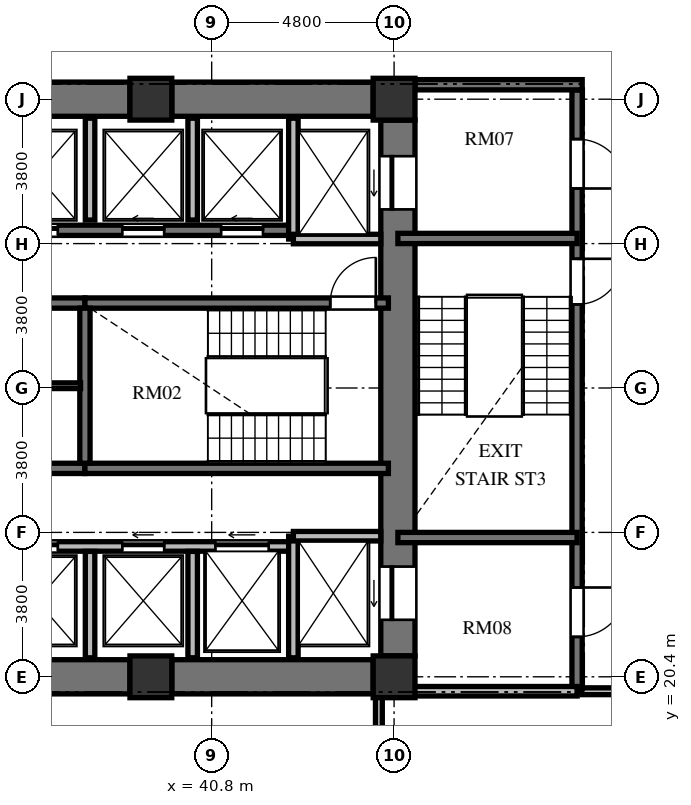
"""IFC4 building model, lengths in metres.
Left out: names, types, materials, properties, quantities, classifications, styles, units other than length and angle.
Written with IfcOpenShell. Run it as: python <this file> out.ifc"""

import sys

from ifc_helpers import new_model, si_unit, direction, frame, frame_2d, origin, origin_2d, place, context, subcontext, project, spatial, rectangle, extrude, element, fill, save


model = new_model("IFC4")
c1 = context("Model", 3, precision=1e-05, world=origin(), true_north=direction((0.0, 1.0)))
c2 = subcontext(c1, "Body", "Model", "MODEL_VIEW")
j1 = project(units=[si_unit("LENGTHUNIT", "METRE"), si_unit("PLANEANGLEUNIT", "RADIAN")], contexts=[c1])
p1 = place(None, origin())
s1 = spatial("IfcSite", under=j1, at=p1, CompositionType="ELEMENT")
p2 = place(p1, origin())
s2 = spatial("IfcBuilding", under=s1, at=p2, CompositionType="ELEMENT")
p3 = place(p2, frame((0.0, 0.0, 32.496)))
s3 = spatial("IfcBuildingStorey", under=s2, at=p3, CompositionType="ELEMENT", Elevation=32.496)
for number, where, z_axis, x_axis in (
    (1, (39.2, 20.4, 0.0), (0.0, 0.0, 1.0), (1.0, 0.0, 0.0)),
    (2, (45.6, 20.4, 0.0), (0.0, 0.0, 1.0), (1.0, 0.0, 0.0)),
    (3, (45.6, 35.6, 0.0), (0.0, 0.0, 1.0), (1.0, 0.0, 0.0)),
    (4, (39.2, 35.6, 0.0), (0.0, 0.0, 1.0), (1.0, 0.0, 0.0)),
):
    element("IfcColumn", number, at=place(p3, frame(where, z_axis=z_axis, x_axis=x_axis)), inside=s3, PredefinedType="COLUMN", context=c2, shape_type="SweptSolid", body=[
        extrude(rectangle(XDim=1.1, YDim=1.1, at=origin_2d()), origin(), (0.0, 0.0, 1.0), 3.648),
    ])
p4 = place(p3, frame((45.7, 20.95, 0.0), z_axis=(0.0, 0.0, 1.0), x_axis=(0.0, 1.0, 0.0)))
e5 = element("IfcWall", 5, at=p4, inside=s3, PredefinedType="SHEAR", context=c2, shape_type="SweptSolid", body=[
    extrude(rectangle(XDim=14.1, YDim=0.9, at=frame_2d((7.05, 0.0))), origin(), (0.0, 0.0, 1.0), 3.648),
])
p5 = place(p4, frame((11.75, 0.0, 0.0)))
e6 = element("IfcOpeningElement", 6, at=p5, cuts=e5, PredefinedType="OPENING", context=c2, shape_type="SweptSolid", body=[
    extrude(rectangle(XDim=1.4, YDim=2.3, at=frame_2d((0.7, 1.15))), frame((0.0, 0.46, 0.0), z_axis=(0.0, -1.0, 0.0), x_axis=(1.0, 0.0, 0.0)), (0.0, 0.0, 1.0), 0.92),
])
p6 = place(p4, frame((0.95, 0.0, 0.0)))
e7 = element("IfcOpeningElement", 7, at=p6, cuts=e5, PredefinedType="OPENING", context=c2, shape_type="SweptSolid", body=[
    extrude(rectangle(XDim=1.4, YDim=2.3, at=frame_2d((0.7, 1.15))), frame((0.0, 0.46, 0.0), z_axis=(0.0, -1.0, 0.0), x_axis=(1.0, 0.0, 0.0)), (0.0, 0.0, 1.0), 0.92),
])
for number, where, z_axis, x_axis in (
    (8, (33.35, 20.4, 0.0), (0.0, 0.0, 1.0), (1.0, 0.0, 0.0)),
    (9, (33.35, 35.6, 0.0), (0.0, 0.0, 1.0), (1.0, 0.0, 0.0)),
):
    element("IfcWall", number, at=place(p3, frame(where, z_axis=z_axis, x_axis=x_axis)), inside=s3, PredefinedType="SHEAR", context=c2, shape_type="SweptSolid", body=[
        extrude(rectangle(XDim=5.3, YDim=0.9, at=frame_2d((2.65, 0.0))), origin(), (0.0, 0.0, 1.0), 3.648),
    ])
for number, where, z_axis, x_axis in (
    (10, (39.75, 20.4, 0.0), (0.0, 0.0, 1.0), (1.0, 0.0, 0.0)),
    (11, (39.75, 35.6, 0.0), (0.0, 0.0, 1.0), (1.0, 0.0, 0.0)),
):
    element("IfcWall", number, at=place(p3, frame(where, z_axis=z_axis, x_axis=x_axis)), inside=s3, PredefinedType="SHEAR", context=c2, shape_type="SweptSolid", body=[
        extrude(rectangle(XDim=5.3, YDim=0.9, at=frame_2d((2.65, 0.0))), origin(), (0.0, 0.0, 1.0), 3.648),
    ])
p7 = place(p3, frame((34.535, 30.235, 0.0), z_axis=(0.0, 0.0, 1.0), x_axis=(1.0, 0.0, 0.0)))
e12 = element("IfcWall", 12, at=p7, inside=s3, PredefinedType="SHEAR", context=c2, shape_type="SweptSolid", body=[
    extrude(rectangle(XDim=2.93, YDim=0.27, at=frame_2d((1.465, 0.0))), origin(), (0.0, 0.0, 1.0), 3.648),
])
p8 = place(p7, frame((0.915, 0.0, 0.0)))
e13 = element("IfcOpeningElement", 13, at=p8, cuts=e12, PredefinedType="OPENING", context=c2, shape_type="SweptSolid", body=[
    extrude(rectangle(XDim=1.1, YDim=2.15, at=frame_2d((0.55, 1.075))), frame((0.0, 0.145, 0.0), z_axis=(0.0, -1.0, 0.0), x_axis=(1.0, 0.0, 0.0)), (0.0, 0.0, 1.0), 0.29),
])
p9 = place(p3, frame((37.465, 30.235, 0.0), z_axis=(0.0, 0.0, 1.0), x_axis=(1.0, 0.0, 0.0)))
e14 = element("IfcWall", 14, at=p9, inside=s3, PredefinedType="SHEAR", context=c2, shape_type="SweptSolid", body=[
    extrude(rectangle(XDim=7.985, YDim=0.27, at=frame_2d((3.992, 0.0))), origin(), (0.0, 0.0, 1.0), 3.648),
])
p10 = place(p9, frame((6.455, 0.0, 0.0)))
e15 = element("IfcOpeningElement", 15, at=p10, cuts=e14, PredefinedType="OPENING", context=c2, shape_type="SweptSolid", body=[
    extrude(rectangle(XDim=1.2, YDim=2.15, at=frame_2d((0.6, 1.075))), frame((0.0, 0.145, 0.0), z_axis=(0.0, -1.0, 0.0), x_axis=(1.0, 0.0, 0.0)), (0.0, 0.0, 1.0), 0.29),
])
p11 = place(p3, frame((34.535, 25.885, 0.0), z_axis=(0.0, 0.0, 1.0), x_axis=(1.0, 0.0, 0.0)))
e16 = element("IfcWall", 16, at=p11, inside=s3, PredefinedType="SHEAR", context=c2, shape_type="SweptSolid", body=[
    extrude(rectangle(XDim=2.93, YDim=0.27, at=frame_2d((1.465, 0.0))), origin(), (0.0, 0.0, 1.0), 3.648),
])
p12 = place(p11, frame((0.94, 0.0, 0.0)))
e17 = element("IfcOpeningElement", 17, at=p12, cuts=e16, PredefinedType="OPENING", context=c2, shape_type="SweptSolid", body=[
    extrude(rectangle(XDim=1.05, YDim=2.15, at=frame_2d((0.525, 1.075))), frame((0.0, 0.145, 0.0), z_axis=(0.0, -1.0, 0.0), x_axis=(1.0, 0.0, 0.0)), (0.0, 0.0, 1.0), 0.29),
])
p13 = place(p3, frame((37.465, 25.885, 0.0), z_axis=(0.0, 0.0, 1.0), x_axis=(1.0, 0.0, 0.0)))
e18 = element("IfcWall", 18, at=p13, inside=s3, PredefinedType="SHEAR", context=c2, shape_type="SweptSolid", body=[
    extrude(rectangle(XDim=7.985, YDim=0.27, at=frame_2d((3.992, 0.0))), origin(), (0.0, 0.0, 1.0), 3.648),
])
p14 = place(p3, frame((37.465, 26.02, 0.0), z_axis=(0.0, 0.0, 1.0), x_axis=(0.0, 1.0, 0.0)))
e19 = element("IfcWall", 19, at=p14, inside=s3, PredefinedType="SHEAR", context=c2, shape_type="SweptSolid", body=[
    extrude(rectangle(XDim=4.08, YDim=0.27, at=frame_2d((2.04, 0.0))), origin(), (0.0, 0.0, 1.0), 3.648),
])
p15 = place(p3, frame((34.65, 28.06, 0.0), z_axis=(0.0, 0.0, 1.0), x_axis=(1.0, 0.0, 0.0)))
e20 = element("IfcWall", 20, at=p15, inside=s3, PredefinedType="PARTITIONING", context=c2, shape_type="SweptSolid", body=[
    extrude(rectangle(XDim=2.7, YDim=0.15, at=frame_2d((1.35, 0.0))), origin(), (0.0, 0.0, 1.0), 3.428),
])
p16 = place(p3, frame((26.55, 32.15, 0.0), z_axis=(0.0, 0.0, 1.0), x_axis=(1.0, 0.0, 0.0)))
e21 = element("IfcWall", 21, at=p16, inside=s3, PredefinedType="SHEAR", context=c2, shape_type="SweptSolid", body=[
    extrude(rectangle(XDim=16.4, YDim=0.27, at=frame_2d((8.2, 0.0))), origin(), (0.0, 0.0, 1.0), 3.648),
])
p17 = place(p16, frame((1.1, 0.0, 0.0)))
e22 = element("IfcOpeningElement", 22, at=p17, cuts=e21, PredefinedType="OPENING", context=c2, shape_type="SweptSolid", body=[
    extrude(rectangle(XDim=1.1, YDim=2.2, at=frame_2d((0.55, 1.1))), frame((0.0, 0.145, 0.0), z_axis=(0.0, -1.0, 0.0), x_axis=(1.0, 0.0, 0.0)), (0.0, 0.0, 1.0), 0.29),
])
p18 = place(p16, frame((3.7, 0.0, 0.0)))
e23 = element("IfcOpeningElement", 23, at=p18, cuts=e21, PredefinedType="OPENING", context=c2, shape_type="SweptSolid", body=[
    extrude(rectangle(XDim=1.1, YDim=2.2, at=frame_2d((0.55, 1.1))), frame((0.0, 0.145, 0.0), z_axis=(0.0, -1.0, 0.0), x_axis=(1.0, 0.0, 0.0)), (0.0, 0.0, 1.0), 0.29),
])
p19 = place(p16, frame((6.5, 0.0, 0.0)))
e24 = element("IfcOpeningElement", 24, at=p19, cuts=e21, PredefinedType="OPENING", context=c2, shape_type="SweptSolid", body=[
    extrude(rectangle(XDim=1.1, YDim=2.2, at=frame_2d((0.55, 1.1))), frame((0.0, 0.145, 0.0), z_axis=(0.0, -1.0, 0.0), x_axis=(1.0, 0.0, 0.0)), (0.0, 0.0, 1.0), 0.29),
])
p20 = place(p16, frame((9.1, 0.0, 0.0)))
e25 = element("IfcOpeningElement", 25, at=p20, cuts=e21, PredefinedType="OPENING", context=c2, shape_type="SweptSolid", body=[
    extrude(rectangle(XDim=1.1, YDim=2.2, at=frame_2d((0.55, 1.1))), frame((0.0, 0.145, 0.0), z_axis=(0.0, -1.0, 0.0), x_axis=(1.0, 0.0, 0.0)), (0.0, 0.0, 1.0), 0.29),
])
p21 = place(p16, frame((11.9, 0.0, 0.0)))
e26 = element("IfcOpeningElement", 26, at=p21, cuts=e21, PredefinedType="OPENING", context=c2, shape_type="SweptSolid", body=[
    extrude(rectangle(XDim=1.1, YDim=2.2, at=frame_2d((0.55, 1.1))), frame((0.0, 0.145, 0.0), z_axis=(0.0, -1.0, 0.0), x_axis=(1.0, 0.0, 0.0)), (0.0, 0.0, 1.0), 0.29),
])
p22 = place(p16, frame((14.5, 0.0, 0.0)))
e27 = element("IfcOpeningElement", 27, at=p22, cuts=e21, PredefinedType="OPENING", context=c2, shape_type="SweptSolid", body=[
    extrude(rectangle(XDim=1.1, YDim=2.2, at=frame_2d((0.55, 1.1))), frame((0.0, 0.145, 0.0), z_axis=(0.0, -1.0, 0.0), x_axis=(1.0, 0.0, 0.0)), (0.0, 0.0, 1.0), 0.29),
])
p23 = place(p3, frame((26.75, 23.83, 0.0), z_axis=(0.0, 0.0, 1.0), x_axis=(1.0, 0.0, 0.0)))
e28 = element("IfcWall", 28, at=p23, inside=s3, PredefinedType="SOLIDWALL", context=c2, shape_type="SweptSolid", body=[
    extrude(rectangle(XDim=16.2, YDim=0.25, at=frame_2d((8.1, 0.0))), origin(), (0.0, 0.0, 1.0), 3.428),
])
p24 = place(p23, frame((0.9, 0.0, 0.0)))
e29 = element("IfcOpeningElement", 29, at=p24, cuts=e28, PredefinedType="OPENING", context=c2, shape_type="SweptSolid", body=[
    extrude(rectangle(XDim=1.1, YDim=2.2, at=frame_2d((0.55, 1.1))), frame((0.0, 0.135, 0.0), z_axis=(0.0, -1.0, 0.0), x_axis=(1.0, 0.0, 0.0)), (0.0, 0.0, 1.0), 0.27),
])
p25 = place(p23, frame((3.5, 0.0, 0.0)))
e30 = element("IfcOpeningElement", 30, at=p25, cuts=e28, PredefinedType="OPENING", context=c2, shape_type="SweptSolid", body=[
    extrude(rectangle(XDim=1.1, YDim=2.2, at=frame_2d((0.55, 1.1))), frame((0.0, 0.135, 0.0), z_axis=(0.0, -1.0, 0.0), x_axis=(1.0, 0.0, 0.0)), (0.0, 0.0, 1.0), 0.27),
])
p26 = place(p23, frame((6.3, 0.0, 0.0)))
e31 = element("IfcOpeningElement", 31, at=p26, cuts=e28, PredefinedType="OPENING", context=c2, shape_type="SweptSolid", body=[
    extrude(rectangle(XDim=1.1, YDim=2.2, at=frame_2d((0.55, 1.1))), frame((0.0, 0.135, 0.0), z_axis=(0.0, -1.0, 0.0), x_axis=(1.0, 0.0, 0.0)), (0.0, 0.0, 1.0), 0.27),
])
p27 = place(p23, frame((8.9, 0.0, 0.0)))
e32 = element("IfcOpeningElement", 32, at=p27, cuts=e28, PredefinedType="OPENING", context=c2, shape_type="SweptSolid", body=[
    extrude(rectangle(XDim=1.1, YDim=2.2, at=frame_2d((0.55, 1.1))), frame((0.0, 0.135, 0.0), z_axis=(0.0, -1.0, 0.0), x_axis=(1.0, 0.0, 0.0)), (0.0, 0.0, 1.0), 0.27),
])
p28 = place(p23, frame((11.7, 0.0, 0.0)))
e33 = element("IfcOpeningElement", 33, at=p28, cuts=e28, PredefinedType="OPENING", context=c2, shape_type="SweptSolid", body=[
    extrude(rectangle(XDim=1.1, YDim=2.2, at=frame_2d((0.55, 1.1))), frame((0.0, 0.135, 0.0), z_axis=(0.0, -1.0, 0.0), x_axis=(1.0, 0.0, 0.0)), (0.0, 0.0, 1.0), 0.27),
])
p29 = place(p23, frame((14.15, 0.0, 0.0)))
e34 = element("IfcOpeningElement", 34, at=p29, cuts=e28, PredefinedType="OPENING", context=c2, shape_type="SweptSolid", body=[
    extrude(rectangle(XDim=1.4, YDim=2.3, at=frame_2d((0.7, 1.15))), frame((0.0, 0.135, 0.0), z_axis=(0.0, -1.0, 0.0), x_axis=(1.0, 0.0, 0.0)), (0.0, 0.0, 1.0), 0.27),
])
p30 = place(p3, frame((42.95, 31.92, 0.0), z_axis=(0.0, 0.0, 1.0), x_axis=(0.0, 1.0, 0.0)))
e35 = element("IfcWall", 35, at=p30, inside=s3, PredefinedType="SOLIDWALL", context=c2, shape_type="SweptSolid", body=[
    extrude(rectangle(XDim=3.18, YDim=0.25, at=frame_2d((1.59, 0.0))), origin(), (0.0, 0.0, 1.0), 3.428),
])
p31 = place(p3, frame((42.95, 31.92, 0.0), z_axis=(0.0, 0.0, 1.0), x_axis=(1.0, 0.0, 0.0)))
e36 = element("IfcWall", 36, at=p31, inside=s3, PredefinedType="SOLIDWALL", context=c2, shape_type="SweptSolid", body=[
    extrude(rectangle(XDim=2.3, YDim=0.25, at=frame_2d((1.15, 0.0))), origin(), (0.0, 0.0, 1.0), 3.428),
])
p32 = place(p3, frame((42.95, 20.9, 0.0), z_axis=(0.0, 0.0, 1.0), x_axis=(0.0, 1.0, 0.0)))
e37 = element("IfcWall", 37, at=p32, inside=s3, PredefinedType="SOLIDWALL", context=c2, shape_type="SweptSolid", body=[
    extrude(rectangle(XDim=3.2, YDim=0.25, at=frame_2d((1.6, 0.0))), origin(), (0.0, 0.0, 1.0), 3.428),
])
p33 = place(p3, frame((42.95, 24.1, 0.0), z_axis=(0.0, 0.0, 1.0), x_axis=(1.0, 0.0, 0.0)))
e38 = element("IfcWall", 38, at=p33, inside=s3, PredefinedType="SOLIDWALL", context=c2, shape_type="SweptSolid", body=[
    extrude(rectangle(XDim=2.3, YDim=0.25, at=frame_2d((1.15, 0.0))), origin(), (0.0, 0.0, 1.0), 3.428),
])
p34 = place(p3, frame((37.6, 32.42, 0.0), z_axis=(0.0, 0.0, 1.0), x_axis=(0.0, 1.0, 0.0)))
e39 = element("IfcWall", 39, at=p34, inside=s3, PredefinedType="SOLIDWALL", context=c2, shape_type="SweptSolid", body=[
    extrude(rectangle(XDim=2.68, YDim=0.25, at=frame_2d((1.34, 0.0))), origin(), (0.0, 0.0, 1.0), 3.428),
])
p35 = place(p3, frame((37.6, 20.9, 0.0), z_axis=(0.0, 0.0, 1.0), x_axis=(0.0, 1.0, 0.0)))
e40 = element("IfcWall", 40, at=p35, inside=s3, PredefinedType="SOLIDWALL", context=c2, shape_type="SweptSolid", body=[
    extrude(rectangle(XDim=2.8, YDim=0.25, at=frame_2d((1.4, 0.0))), origin(), (0.0, 0.0, 1.0), 3.428),
])
p36 = place(p3, frame((40.3, 32.42, 0.0), z_axis=(0.0, 0.0, 1.0), x_axis=(0.0, 1.0, 0.0)))
e41 = element("IfcWall", 41, at=p36, inside=s3, PredefinedType="SOLIDWALL", context=c2, shape_type="SweptSolid", body=[
    extrude(rectangle(XDim=2.68, YDim=0.25, at=frame_2d((1.34, 0.0))), origin(), (0.0, 0.0, 1.0), 3.428),
])
p37 = place(p3, frame((40.3, 20.9, 0.0), z_axis=(0.0, 0.0, 1.0), x_axis=(0.0, 1.0, 0.0)))
e42 = element("IfcWall", 42, at=p37, inside=s3, PredefinedType="SOLIDWALL", context=c2, shape_type="SweptSolid", body=[
    extrude(rectangle(XDim=2.8, YDim=0.25, at=frame_2d((1.4, 0.0))), origin(), (0.0, 0.0, 1.0), 3.428),
])
p38 = place(p3, frame((50.415, 35.845, 0.0), z_axis=(0.0, 0.0, 1.0), x_axis=(0.0, -1.0, 0.0)))
e43 = element("IfcWall", 43, at=p38, inside=s3, PredefinedType="SHEAR", context=c2, shape_type="SweptSolid", body=[
    extrude(rectangle(XDim=15.825, YDim=0.27, at=frame_2d((7.913, 0.0))), origin(), (0.0, 0.0, 1.0), 3.648),
])
p39 = place(p38, frame((4.445, 0.0, 0.0)))
e44 = element("IfcOpeningElement", 44, at=p39, cuts=e43, PredefinedType="OPENING", context=c2, shape_type="SweptSolid", body=[
    extrude(rectangle(XDim=1.2, YDim=2.15, at=frame_2d((0.6, 1.075))), frame((0.0, 0.145, 0.0), z_axis=(0.0, -1.0, 0.0), x_axis=(1.0, 0.0, 0.0)), (0.0, 0.0, 1.0), 0.29),
])
p40 = place(p38, frame((1.295, 0.0, 0.0)))
e45 = element("IfcOpeningElement", 45, at=p40, cuts=e43, PredefinedType="OPENING", context=c2, shape_type="SweptSolid", body=[
    extrude(rectangle(XDim=1.3, YDim=2.2, at=frame_2d((0.65, 1.1))), frame((0.0, 0.145, 0.0), z_axis=(0.0, -1.0, 0.0), x_axis=(1.0, 0.0, 0.0)), (0.0, 0.0, 1.0), 0.29),
])
p41 = place(p38, frame((13.095, 0.0, 0.0)))
e46 = element("IfcOpeningElement", 46, at=p41, cuts=e43, PredefinedType="OPENING", context=c2, shape_type="SweptSolid", body=[
    extrude(rectangle(XDim=1.3, YDim=2.2, at=frame_2d((0.65, 1.1))), frame((0.0, 0.145, 0.0), z_axis=(0.0, -1.0, 0.0), x_axis=(1.0, 0.0, 0.0)), (0.0, 0.0, 1.0), 0.29),
])
p42 = place(p3, frame((46.15, 35.98, 0.0), z_axis=(0.0, 0.0, 1.0), x_axis=(1.0, 0.0, 0.0)))
e47 = element("IfcWall", 47, at=p42, inside=s3, PredefinedType="SHEAR", context=c2, shape_type="SweptSolid", body=[
    extrude(rectangle(XDim=4.4, YDim=0.27, at=frame_2d((2.2, 0.0))), origin(), (0.0, 0.0, 1.0), 3.648),
])
for number, where, z_axis, x_axis in (
    (48, (45.7, 31.935, 0.0), (0.0, 0.0, 1.0), (1.0, 0.0, 0.0)),
    (49, (45.7, 24.065, 0.0), (0.0, 0.0, 1.0), (1.0, 0.0, 0.0)),
):
    element("IfcWall", number, at=place(p3, frame(where, z_axis=z_axis, x_axis=x_axis)), inside=s3, PredefinedType="SHEAR", context=c2, shape_type="SweptSolid", body=[
        extrude(rectangle(XDim=4.715, YDim=0.27, at=frame_2d((2.357, 0.0))), origin(), (0.0, 0.0, 1.0), 3.648),
    ])
p43 = place(p3, frame((45.7, 20.02, 0.0), z_axis=(0.0, 0.0, 1.0), x_axis=(1.0, 0.0, 0.0)))
e50 = element("IfcWall", 50, at=p43, inside=s3, PredefinedType="SOLIDWALL", context=c2, shape_type="SweptSolid", body=[
    extrude(rectangle(XDim=4.715, YDim=0.25, at=frame_2d((2.357, 0.0))), origin(), (0.0, 0.0, 1.0), 2.813),
])
p44 = place(p3, frame((53.19, 20.02, 0.0), z_axis=(0.0, 0.0, 1.0), x_axis=(-1.0, 0.0, 0.0)))
e51 = element("IfcWall", 51, at=p44, inside=s3, PredefinedType="PARTITIONING", context=c2, shape_type="SweptSolid", body=[
    extrude(rectangle(XDim=2.65, YDim=0.18, at=frame_2d((1.325, 0.0))), origin(), (0.0, 0.0, 1.0), 2.813),
])
p45 = place(p3, frame((45.2, 19.91, 0.0), z_axis=(0.0, 0.0, 1.0), x_axis=(0.0, -1.0, 0.0)))
e52 = element("IfcWall", 52, at=p45, inside=s3, PredefinedType="PARTITIONING", context=c2, shape_type="SweptSolid", body=[
    extrude(rectangle(XDim=2.55, YDim=0.18, at=frame_2d((1.275, 0.0))), origin(), (0.0, 0.0, 1.0), 3.428),
])
p46 = place(p10, origin())
e53 = element("IfcDoor", 53, at=p46, inside=s3, OperationType="SINGLE_SWING_RIGHT", PredefinedType="DOOR", context=c2, shape_type="SweptSolid", body=[
    extrude(rectangle(XDim=1.2, YDim=2.15, at=frame_2d((0.6, 1.075))), frame((0.0, 0.025, 0.0), z_axis=(0.0, -1.0, 0.0), x_axis=(1.0, 0.0, 0.0)), (0.0, 0.0, 1.0), 0.05),
])
fill(e15, e53)
p47 = place(p20, origin())
e54 = element("IfcDoor", 54, at=p47, inside=s3, OperationType="SLIDING_TO_LEFT", PredefinedType="DOOR", context=c2, shape_type="SweptSolid", body=[
    extrude(rectangle(XDim=1.1, YDim=2.2, at=frame_2d((0.55, 1.1))), frame((0.0, 0.025, 0.0), z_axis=(0.0, -1.0, 0.0), x_axis=(1.0, 0.0, 0.0)), (0.0, 0.0, 1.0), 0.05),
])
fill(e25, e54)
p48 = place(p27, origin())
e55 = element("IfcDoor", 55, at=p48, inside=s3, OperationType="SLIDING_TO_LEFT", PredefinedType="DOOR", context=c2, shape_type="SweptSolid", body=[
    extrude(rectangle(XDim=1.1, YDim=2.2, at=frame_2d((0.55, 1.1))), frame((0.0, 0.025, 0.0), z_axis=(0.0, -1.0, 0.0), x_axis=(1.0, 0.0, 0.0)), (0.0, 0.0, 1.0), 0.05),
])
fill(e32, e55)
p49 = place(p21, origin())
e56 = element("IfcDoor", 56, at=p49, inside=s3, OperationType="SLIDING_TO_LEFT", PredefinedType="DOOR", context=c2, shape_type="SweptSolid", body=[
    extrude(rectangle(XDim=1.1, YDim=2.2, at=frame_2d((0.55, 1.1))), frame((0.0, 0.025, 0.0), z_axis=(0.0, -1.0, 0.0), x_axis=(1.0, 0.0, 0.0)), (0.0, 0.0, 1.0), 0.05),
])
fill(e26, e56)
p50 = place(p22, origin())
e57 = element("IfcDoor", 57, at=p50, inside=s3, OperationType="SLIDING_TO_LEFT", PredefinedType="DOOR", context=c2, shape_type="SweptSolid", body=[
    extrude(rectangle(XDim=1.1, YDim=2.2, at=frame_2d((0.55, 1.1))), frame((0.0, 0.025, 0.0), z_axis=(0.0, -1.0, 0.0), x_axis=(1.0, 0.0, 0.0)), (0.0, 0.0, 1.0), 0.05),
])
fill(e27, e57)
p51 = place(p28, origin())
e58 = element("IfcDoor", 58, at=p51, inside=s3, OperationType="SLIDING_TO_LEFT", PredefinedType="DOOR", context=c2, shape_type="SweptSolid", body=[
    extrude(rectangle(XDim=1.1, YDim=2.2, at=frame_2d((0.55, 1.1))), frame((0.0, 0.025, 0.0), z_axis=(0.0, -1.0, 0.0), x_axis=(1.0, 0.0, 0.0)), (0.0, 0.0, 1.0), 0.05),
])
fill(e33, e58)
p52 = place(p5, origin())
e59 = element("IfcDoor", 59, at=p52, inside=s3, OperationType="SLIDING_TO_LEFT", PredefinedType="DOOR", context=c2, shape_type="SweptSolid", body=[
    extrude(rectangle(XDim=1.4, YDim=2.3, at=frame_2d((0.7, 1.15))), frame((0.0, 0.025, 0.0), z_axis=(0.0, -1.0, 0.0), x_axis=(1.0, 0.0, 0.0)), (0.0, 0.0, 1.0), 0.05),
])
fill(e6, e59)
p53 = place(p6, origin())
e60 = element("IfcDoor", 60, at=p53, inside=s3, OperationType="SLIDING_TO_LEFT", PredefinedType="DOOR", context=c2, shape_type="SweptSolid", body=[
    extrude(rectangle(XDim=1.4, YDim=2.3, at=frame_2d((0.7, 1.15))), frame((0.0, 0.025, 0.0), z_axis=(0.0, -1.0, 0.0), x_axis=(1.0, 0.0, 0.0)), (0.0, 0.0, 1.0), 0.05),
])
fill(e7, e60)
p54 = place(p29, origin())
e61 = element("IfcDoor", 61, at=p54, inside=s3, OperationType="SLIDING_TO_LEFT", PredefinedType="DOOR", context=c2, shape_type="SweptSolid", body=[
    extrude(rectangle(XDim=1.4, YDim=2.3, at=frame_2d((0.7, 1.15))), frame((0.0, 0.025, 0.0), z_axis=(0.0, -1.0, 0.0), x_axis=(1.0, 0.0, 0.0)), (0.0, 0.0, 1.0), 0.05),
])
fill(e34, e61)
p55 = place(p39, origin())
e62 = element("IfcDoor", 62, at=p55, inside=s3, OperationType="SINGLE_SWING_LEFT", PredefinedType="DOOR", context=c2, shape_type="SweptSolid", body=[
    extrude(rectangle(XDim=1.2, YDim=2.15, at=frame_2d((0.6, 1.075))), frame((0.0, 0.025, 0.0), z_axis=(0.0, -1.0, 0.0), x_axis=(1.0, 0.0, 0.0)), (0.0, 0.0, 1.0), 0.05),
])
fill(e44, e62)
p56 = place(p40, origin())
e63 = element("IfcDoor", 63, at=p56, inside=s3, OperationType="SINGLE_SWING_RIGHT", PredefinedType="DOOR", context=c2, shape_type="SweptSolid", body=[
    extrude(rectangle(XDim=1.3, YDim=2.2, at=frame_2d((0.65, 1.1))), frame((0.0, 0.025, 0.0), z_axis=(0.0, -1.0, 0.0), x_axis=(1.0, 0.0, 0.0)), (0.0, 0.0, 1.0), 0.05),
])
fill(e45, e63)
p57 = place(p41, origin())
e64 = element("IfcDoor", 64, at=p57, inside=s3, OperationType="SINGLE_SWING_LEFT", PredefinedType="DOOR", context=c2, shape_type="SweptSolid", body=[
    extrude(rectangle(XDim=1.3, YDim=2.2, at=frame_2d((0.65, 1.1))), frame((0.0, 0.025, 0.0), z_axis=(0.0, -1.0, 0.0), x_axis=(1.0, 0.0, 0.0)), (0.0, 0.0, 1.0), 0.05),
])
fill(e46, e64)
save(model, sys.argv[1])
